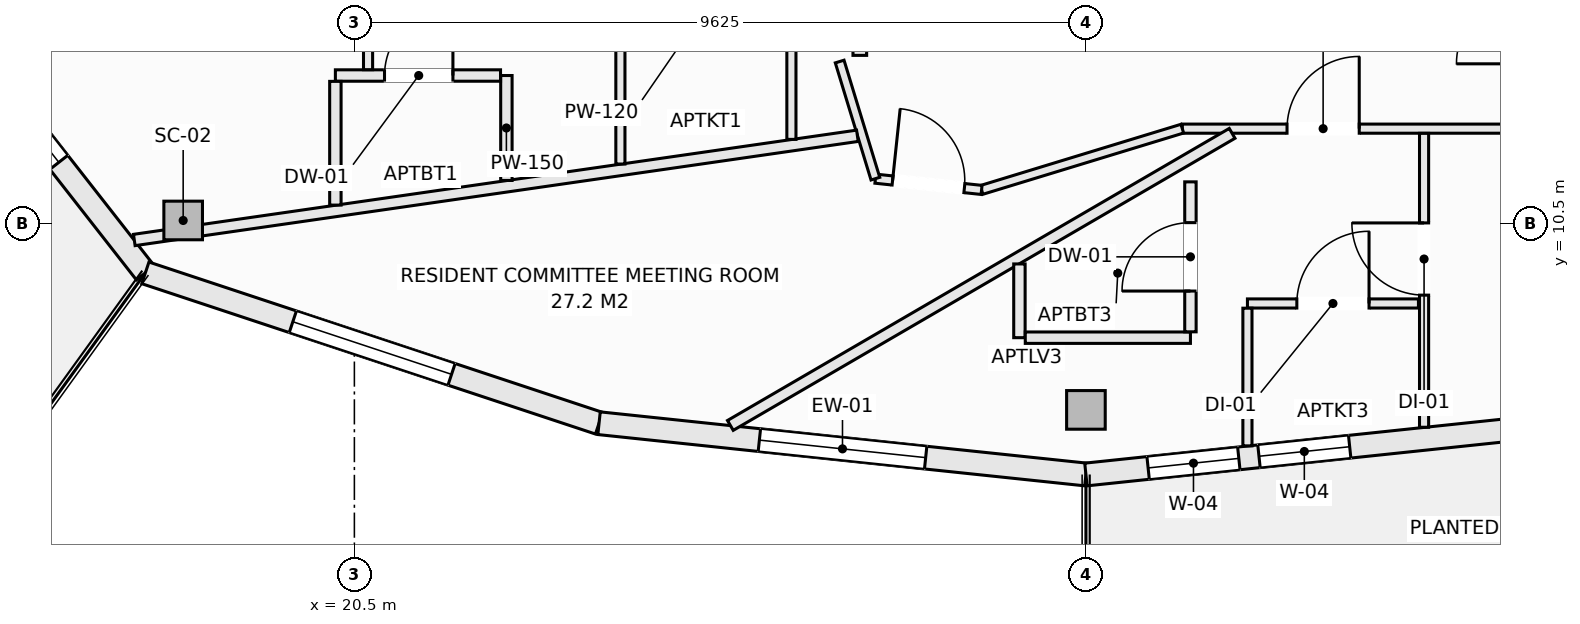
"""IFC4 building model, lengths in metres.
Left out: names, types, materials, properties, quantities, classifications, styles, units other than length and angle.
Written with IfcOpenShell. Run it as: python <this file> out.ifc"""

import sys

from ifc_helpers import new_model, si_unit, direction, frame, frame_2d, origin, origin_2d, place, context, subcontext, project, spatial, rectangle, hollow_rectangle, extrude, element, fill, save


model = new_model("IFC4")
c1 = context("Model", 3, precision=1e-05, world=origin(), true_north=direction((0.0, 1.0)))
c2 = subcontext(c1, "Body", "Model", "MODEL_VIEW")
j1 = project(units=[si_unit("LENGTHUNIT", "METRE"), si_unit("PLANEANGLEUNIT", "RADIAN")], contexts=[c1])
p1 = place(None, origin())
s1 = spatial("IfcSite", under=j1, at=p1, CompositionType="ELEMENT")
p2 = place(p1, origin())
s2 = spatial("IfcBuilding", under=s1, at=p2, CompositionType="ELEMENT")
p3 = place(p2, frame((0.0, 0.0, 232.7)))
s3 = spatial("IfcBuildingStorey", under=s2, at=p3, CompositionType="ELEMENT", Elevation=232.7)
for number, where, z_axis, x_axis in (
    (1, (18.247, 10.542, -0.27), (0.0, 0.0, 1.0), (1.0, 0.0, 0.0)),
    (2, (30.125, 8.05, -0.27), (0.0, 0.0, 1.0), (1.0, 0.0, 0.0)),
):
    element("IfcColumn", number, at=place(p3, frame(where, z_axis=z_axis, x_axis=x_axis)), inside=s3, PredefinedType="COLUMN", context=c2, shape_type="SweptSolid", body=[
        extrude(hollow_rectangle(XDim=0.508, YDim=0.508, WallThickness=0.019, at=origin_2d()), origin(), (0.0, 0.0, 1.0), 3.3),
    ])
p4 = place(p3, frame((14.117, 14.493, 0.0), z_axis=(0.0, 0.0, 1.0), x_axis=(0.616450126935, -0.787393955401, 0.0)))
e3 = element("IfcWall", 3, at=p4, inside=s3, PredefinedType="SOLIDWALL", context=c2, shape_type="SweptSolid", body=[
    extrude(rectangle(XDim=5.893, YDim=0.3, at=frame_2d((2.946, 0.0))), origin(), (0.0, 0.0, 1.0), 2.605),
])
p5 = place(p4, frame((1.846, 0.0, 0.72)))
e4 = element("IfcOpeningElement", 4, at=p5, cuts=e3, PredefinedType="OPENING", context=c2, shape_type="SweptSolid", body=[
    extrude(rectangle(XDim=2.2, YDim=1.65, at=frame_2d((1.1, 0.825))), frame((0.0, 0.16, 0.0), z_axis=(0.0, -1.0, 0.0), x_axis=(1.0, 0.0, 0.0)), (0.0, 0.0, 1.0), 0.32),
])
p6 = place(p3, frame((17.75, 9.853, 0.0), z_axis=(0.0, 0.0, 1.0), x_axis=(0.949240877604, -0.314550085495, 0.0)))
e5 = element("IfcWall", 5, at=p6, inside=s3, PredefinedType="SOLIDWALL", context=c2, shape_type="SweptSolid", body=[
    extrude(rectangle(XDim=6.288, YDim=0.3, at=frame_2d((3.144, 0.0))), origin(), (0.0, 0.0, 1.0), 2.605),
])
p7 = place(p6, frame((2.044, 0.0, 0.72)))
e6 = element("IfcOpeningElement", 6, at=p7, cuts=e5, PredefinedType="OPENING", context=c2, shape_type="SweptSolid", body=[
    extrude(rectangle(XDim=2.2, YDim=1.65, at=frame_2d((1.1, 0.825))), frame((0.0, 0.16, 0.0), z_axis=(0.0, -1.0, 0.0), x_axis=(1.0, 0.0, 0.0)), (0.0, 0.0, 1.0), 0.32),
])
p8 = place(p3, frame((23.719, 7.875, 0.0), z_axis=(0.0, 0.0, 1.0), x_axis=(0.994497142298, -0.104763705363, 0.0)))
e7 = element("IfcWall", 7, at=p8, inside=s3, PredefinedType="SOLIDWALL", context=c2, shape_type="SweptSolid", body=[
    extrude(rectangle(XDim=6.441, YDim=0.3, at=frame_2d((3.221, 0.0))), origin(), (0.0, 0.0, 1.0), 2.605),
])
p9 = place(p8, frame((2.121, 0.0, 0.72)))
e8 = element("IfcOpeningElement", 8, at=p9, cuts=e7, PredefinedType="OPENING", context=c2, shape_type="SweptSolid", body=[
    extrude(rectangle(XDim=2.2, YDim=1.65, at=frame_2d((1.1, 0.825))), frame((0.0, 0.16, 0.0), z_axis=(0.0, -1.0, 0.0), x_axis=(1.0, 0.0, 0.0)), (0.0, 0.0, 1.0), 0.32),
])
p10 = place(p3, frame((30.125, 7.2, 0.0), z_axis=(0.0, 0.0, 1.0), x_axis=(0.994497142298, 0.104763705363, 0.0)))
e9 = element("IfcWall", 9, at=p10, inside=s3, PredefinedType="SOLIDWALL", context=c2, shape_type="SweptSolid", body=[
    extrude(rectangle(XDim=6.441, YDim=0.3, at=frame_2d((3.221, 0.0))), origin(), (0.0, 0.0, 1.0), 2.605),
])
p11 = place(p10, frame((0.823, 0.0, 0.72)))
e10 = element("IfcOpeningElement", 10, at=p11, cuts=e9, PredefinedType="OPENING", context=c2, shape_type="SweptSolid", body=[
    extrude(rectangle(XDim=1.2, YDim=1.65, at=frame_2d((0.6, 0.825))), frame((0.0, 0.16, 0.0), z_axis=(0.0, -1.0, 0.0), x_axis=(1.0, 0.0, 0.0)), (0.0, 0.0, 1.0), 0.32),
])
p12 = place(p10, frame((2.289, 0.0, 0.72)))
e11 = element("IfcOpeningElement", 11, at=p12, cuts=e9, PredefinedType="OPENING", context=c2, shape_type="SweptSolid", body=[
    extrude(rectangle(XDim=1.2, YDim=1.65, at=frame_2d((0.6, 0.825))), frame((0.0, 0.16, 0.0), z_axis=(0.0, -1.0, 0.0), x_axis=(1.0, 0.0, 0.0)), (0.0, 0.0, 1.0), 0.32),
])
p13 = place(p3, frame((27.15, 12.714, 0.0), z_axis=(0.0, 0.0, 1.0), x_axis=(0.0, 1.0, 0.0)))
e12 = element("IfcWall", 12, at=p13, inside=s3, PredefinedType="SOLIDWALL", context=c2, shape_type="SweptSolid", body=[
    extrude(rectangle(XDim=4.244, YDim=0.18, at=frame_2d((2.122, 0.0))), origin(), (0.0, 0.0, 1.0), 3.03),
])
p14 = place(p13, frame((0.928, 0.0, 0.0)))
e13 = element("IfcOpeningElement", 13, at=p14, cuts=e12, PredefinedType="OPENING", context=c2, shape_type="SweptSolid", body=[
    extrude(rectangle(XDim=0.95, YDim=2.1, at=frame_2d((0.475, 1.05))), frame((0.0, 0.1, 0.0), z_axis=(0.0, -1.0, 0.0), x_axis=(1.0, 0.0, 0.0)), (0.0, 0.0, 1.0), 0.2),
])
p15 = place(p13, frame((2.64, 0.0, 0.0)))
e14 = element("IfcOpeningElement", 14, at=p15, cuts=e12, PredefinedType="OPENING", context=c2, shape_type="SweptSolid", body=[
    extrude(rectangle(XDim=0.95, YDim=2.1, at=frame_2d((0.475, 1.05))), frame((0.0, 0.1, 0.0), z_axis=(0.0, -1.0, 0.0), x_axis=(1.0, 0.0, 0.0)), (0.0, 0.0, 1.0), 0.2),
])
p16 = place(p3, frame((31.393, 11.75, 0.0), z_axis=(0.0, 0.0, 1.0), x_axis=(1.0, 0.0, 0.0)))
e15 = element("IfcWall", 15, at=p16, inside=s3, PredefinedType="PARTITIONING", context=c2, shape_type="SweptSolid", body=[
    extrude(rectangle(XDim=4.495, YDim=0.12, at=frame_2d((2.248, 0.0))), origin(), (0.0, 0.0, 1.0), 3.03),
])
p17 = place(p16, frame((1.378, 0.0, 0.0)))
e16 = element("IfcOpeningElement", 16, at=p17, cuts=e15, PredefinedType="OPENING", context=c2, shape_type="SweptSolid", body=[
    extrude(rectangle(XDim=0.95, YDim=2.1, at=frame_2d((0.475, 1.05))), frame((0.0, 0.07, 0.0), z_axis=(0.0, -1.0, 0.0), x_axis=(1.0, 0.0, 0.0)), (0.0, 0.0, 1.0), 0.14),
])
p18 = place(p3, frame((28.752, 10.944, 0.0), z_axis=(0.0, 0.0, 1.0), x_axis=(0.956462690075, 0.291854625618, 0.0)))
e17 = element("IfcWall", 17, at=p18, inside=s3, PredefinedType="PARTITIONING", context=c2, shape_type="SweptSolid", body=[
    extrude(rectangle(XDim=2.761, YDim=0.12, at=frame_2d((1.381, 0.0))), origin(), (0.0, 0.0, 1.0), 3.03),
])
p19 = place(p3, frame((27.355, 11.092, 0.0), z_axis=(0.0, 0.0, 1.0), x_axis=(0.994438591301, -0.105318033263, 0.0)))
e18 = element("IfcWall", 18, at=p19, inside=s3, PredefinedType="PARTITIONING", context=c2, shape_type="SweptSolid", body=[
    extrude(rectangle(XDim=1.405, YDim=0.12, at=frame_2d((0.702, 0.0))), origin(), (0.0, 0.0, 1.0), 3.03),
])
p20 = place(p19, frame((0.227, 0.0, 0.0)))
e19 = element("IfcOpeningElement", 19, at=p20, cuts=e18, PredefinedType="OPENING", context=c2, shape_type="SweptSolid", body=[
    extrude(rectangle(XDim=0.95, YDim=2.1, at=frame_2d((0.475, 1.05))), frame((0.0, 0.07, 0.0), z_axis=(0.0, -1.0, 0.0), x_axis=(1.0, 0.0, 0.0)), (0.0, 0.0, 1.0), 0.14),
])
p21 = place(p3, frame((26.885, 12.633, 0.0), z_axis=(0.0, 0.0, 1.0), x_axis=(0.291710302586, -0.956506716843, 0.0)))
e20 = element("IfcWall", 20, at=p21, inside=s3, PredefinedType="PARTITIONING", context=c2, shape_type="SweptSolid", body=[
    extrude(rectangle(XDim=1.611, YDim=0.12, at=frame_2d((0.806, 0.0))), origin(), (0.0, 0.0, 1.0), 3.03),
])
p22 = place(p3, frame((17.604, 10.285, 0.0), z_axis=(0.0, 0.0, 1.0), x_axis=(0.989781675617, 0.142591144933, 0.0)))
e21 = element("IfcWall", 21, at=p22, inside=s3, PredefinedType="PARTITIONING", context=c2, shape_type="SweptSolid", body=[
    extrude(rectangle(XDim=9.612, YDim=0.15, at=frame_2d((4.806, 0.0))), origin(), (0.0, 0.0, 1.0), 2.605),
])
p23 = place(p3, frame((26.25, 11.609, 0.0), z_axis=(0.0, 0.0, 1.0), x_axis=(0.0, 1.0, 0.0)))
e22 = element("IfcWall", 22, at=p23, inside=s3, PredefinedType="PARTITIONING", context=c2, shape_type="SweptSolid", body=[
    extrude(rectangle(XDim=1.691, YDim=0.12, at=frame_2d((0.846, 0.0))), origin(), (0.0, 0.0, 1.0), 3.03),
])
p24 = place(p3, frame((24.0, 11.285, 0.0), z_axis=(0.0, 0.0, 1.0), x_axis=(0.0, 1.0, 0.0)))
e23 = element("IfcWall", 23, at=p24, inside=s3, PredefinedType="PARTITIONING", context=c2, shape_type="SweptSolid", body=[
    extrude(rectangle(XDim=1.953, YDim=0.12, at=frame_2d((0.977, 0.0))), origin(), (0.0, 0.0, 1.0), 3.03),
])
p25 = place(p3, frame((22.5, 11.069, 0.0), z_axis=(0.0, 0.0, 1.0), x_axis=(0.0, 1.0, 0.0)))
e24 = element("IfcWall", 24, at=p25, inside=s3, PredefinedType="PARTITIONING", context=c2, shape_type="SweptSolid", body=[
    extrude(rectangle(XDim=1.38, YDim=0.15, at=frame_2d((0.69, 0.0))), origin(), (0.0, 0.0, 1.0), 3.03),
])
p26 = place(p3, frame((20.25, 12.449, 0.0), z_axis=(0.0, 0.0, 1.0), x_axis=(1.0, 0.0, 0.0)))
e25 = element("IfcWall", 25, at=p26, inside=s3, PredefinedType="PARTITIONING", context=c2, shape_type="SweptSolid", body=[
    extrude(rectangle(XDim=2.173, YDim=0.15, at=frame_2d((1.086, 0.0))), origin(), (0.0, 0.0, 1.0), 3.03),
])
p27 = place(p26, frame((0.646, 0.0, 0.0)))
e26 = element("IfcOpeningElement", 26, at=p27, cuts=e25, PredefinedType="OPENING", context=c2, shape_type="SweptSolid", body=[
    extrude(rectangle(XDim=0.9, YDim=2.1, at=frame_2d((0.45, 1.05))), frame((0.0, 0.085, 0.0), z_axis=(0.0, -1.0, 0.0), x_axis=(1.0, 0.0, 0.0)), (0.0, 0.0, 1.0), 0.17),
])
p28 = place(p3, frame((20.68, 12.526, 0.0), z_axis=(0.0, 0.0, 1.0), x_axis=(0.0, 1.0, 0.0)))
e27 = element("IfcWall", 27, at=p28, inside=s3, PredefinedType="PARTITIONING", context=c2, shape_type="SweptSolid", body=[
    extrude(rectangle(XDim=2.379, YDim=0.12, at=frame_2d((1.189, 0.0))), origin(), (0.0, 0.0, 1.0), 2.478),
])
p29 = place(p28, frame((0.715, 0.0, 0.0)))
e28 = element("IfcOpeningElement", 28, at=p29, cuts=e27, PredefinedType="OPENING", context=c2, shape_type="SweptSolid", body=[
    extrude(rectangle(XDim=0.95, YDim=2.1, at=frame_2d((0.475, 1.05))), frame((0.0, 0.07, 0.0), z_axis=(0.0, -1.0, 0.0), x_axis=(1.0, 0.0, 0.0)), (0.0, 0.0, 1.0), 0.14),
])
p30 = place(p3, frame((20.25, 10.744, 0.0), z_axis=(0.0, 0.0, 1.0), x_axis=(0.0, 1.0, 0.0)))
e29 = element("IfcWall", 29, at=p30, inside=s3, PredefinedType="PARTITIONING", context=c2, shape_type="SweptSolid", body=[
    extrude(rectangle(XDim=1.628, YDim=0.15, at=frame_2d((0.814, 0.0))), origin(), (0.0, 0.0, 1.0), 3.03),
])
p31 = place(p3, frame((25.447, 7.846, 0.0), z_axis=(0.0, 0.0, 1.0), x_axis=(0.864278106544, 0.503014268732, 0.0)))
e30 = element("IfcWall", 30, at=p31, inside=s3, PredefinedType="PARTITIONING", context=c2, shape_type="SweptSolid", body=[
    extrude(rectangle(XDim=7.638, YDim=0.15, at=frame_2d((3.819, 0.0))), origin(), (0.0, 0.0, 1.0), 3.03),
])
p32 = place(p3, frame((34.574, 7.821, 0.0), z_axis=(0.0, 0.0, 1.0), x_axis=(0.0, 1.0, 0.0)))
e31 = element("IfcWall", 31, at=p32, inside=s3, PredefinedType="PARTITIONING", context=c2, shape_type="SweptSolid", body=[
    extrude(rectangle(XDim=3.867, YDim=0.12, at=frame_2d((1.933, 0.0))), origin(), (0.0, 0.0, 1.0), 3.03),
])
p33 = place(p32, frame((1.738, 0.0, 0.0)))
e32 = element("IfcOpeningElement", 32, at=p33, cuts=e31, PredefinedType="OPENING", context=c2, shape_type="SweptSolid", body=[
    extrude(rectangle(XDim=0.95, YDim=2.1, at=frame_2d((0.475, 1.05))), frame((0.0, 0.07, 0.0), z_axis=(0.0, -1.0, 0.0), x_axis=(1.0, 0.0, 0.0)), (0.0, 0.0, 1.0), 0.14),
])
p34 = place(p3, frame((32.25, 9.45, 0.0), z_axis=(0.0, 0.0, 1.0), x_axis=(1.0, 0.0, 0.0)))
e33 = element("IfcWall", 33, at=p34, inside=s3, PredefinedType="PARTITIONING", context=c2, shape_type="SweptSolid", body=[
    extrude(rectangle(XDim=2.25, YDim=0.12, at=frame_2d((1.125, 0.0))), origin(), (0.0, 0.0, 1.0), 3.03),
])
p35 = place(p34, frame((0.65, 0.0, 0.0)))
e34 = element("IfcOpeningElement", 34, at=p35, cuts=e33, PredefinedType="OPENING", context=c2, shape_type="SweptSolid", body=[
    extrude(rectangle(XDim=0.95, YDim=2.1, at=frame_2d((0.475, 1.05))), frame((0.0, 0.07, 0.0), z_axis=(0.0, -1.0, 0.0), x_axis=(1.0, 0.0, 0.0)), (0.0, 0.0, 1.0), 0.14),
])
p36 = place(p3, frame((32.25, 7.577, 0.0), z_axis=(0.0, 0.0, 1.0), x_axis=(0.0, 1.0, 0.0)))
e35 = element("IfcWall", 35, at=p36, inside=s3, PredefinedType="PARTITIONING", context=c2, shape_type="SweptSolid", body=[
    extrude(rectangle(XDim=1.811, YDim=0.12, at=frame_2d((0.906, 0.0))), origin(), (0.0, 0.0, 1.0), 3.03),
])
p37 = place(p3, frame((29.25, 9.0, 0.0), z_axis=(0.0, 0.0, 1.0), x_axis=(0.0, 1.0, 0.0)))
e36 = element("IfcWall", 36, at=p37, inside=s3, PredefinedType="PARTITIONING", context=c2, shape_type="SweptSolid", body=[
    extrude(rectangle(XDim=0.97, YDim=0.15, at=frame_2d((0.485, 0.0))), origin(), (0.0, 0.0, 1.0), 3.03),
])
p38 = place(p3, frame((29.327, 9.0, 0.0), z_axis=(0.0, 0.0, 1.0), x_axis=(1.0, 0.0, 0.0)))
e37 = element("IfcWall", 37, at=p38, inside=s3, PredefinedType="PARTITIONING", context=c2, shape_type="SweptSolid", body=[
    extrude(rectangle(XDim=2.173, YDim=0.15, at=frame_2d((1.086, 0.0))), origin(), (0.0, 0.0, 1.0), 3.03),
])
p39 = place(p3, frame((31.5, 9.077, 0.0), z_axis=(0.0, 0.0, 1.0), x_axis=(0.0, 1.0, 0.0)))
e38 = element("IfcWall", 38, at=p39, inside=s3, PredefinedType="PARTITIONING", context=c2, shape_type="SweptSolid", body=[
    extrude(rectangle(XDim=1.973, YDim=0.15, at=frame_2d((0.987, 0.0))), origin(), (0.0, 0.0, 1.0), 3.03),
])
p40 = place(p39, frame((0.537, 0.0, 0.0)))
e39 = element("IfcOpeningElement", 39, at=p40, cuts=e38, PredefinedType="OPENING", context=c2, shape_type="SweptSolid", body=[
    extrude(rectangle(XDim=0.9, YDim=2.1, at=frame_2d((0.45, 1.05))), frame((0.0, 0.085, 0.0), z_axis=(0.0, -1.0, 0.0), x_axis=(1.0, 0.0, 0.0)), (0.0, 0.0, 1.0), 0.17),
])
p41 = place(p5, origin())
e40 = element("IfcWindow", 40, at=p41, inside=s3, PartitioningType="SINGLE_PANEL", PredefinedType="WINDOW", context=c2, shape_type="SweptSolid", body=[
    extrude(rectangle(XDim=2.2, YDim=1.65, at=frame_2d((1.1, 0.825))), frame((0.0, 0.03, 0.0), z_axis=(0.0, -1.0, 0.0), x_axis=(1.0, 0.0, 0.0)), (0.0, 0.0, 1.0), 0.06),
])
fill(e4, e40)
p42 = place(p7, origin())
e41 = element("IfcWindow", 41, at=p42, inside=s3, PartitioningType="SINGLE_PANEL", PredefinedType="WINDOW", context=c2, shape_type="SweptSolid", body=[
    extrude(rectangle(XDim=2.2, YDim=1.65, at=frame_2d((1.1, 0.825))), frame((0.0, 0.03, 0.0), z_axis=(0.0, -1.0, 0.0), x_axis=(1.0, 0.0, 0.0)), (0.0, 0.0, 1.0), 0.06),
])
fill(e6, e41)
p43 = place(p9, origin())
e42 = element("IfcWindow", 42, at=p43, inside=s3, PartitioningType="SINGLE_PANEL", PredefinedType="WINDOW", context=c2, shape_type="SweptSolid", body=[
    extrude(rectangle(XDim=2.2, YDim=1.65, at=frame_2d((1.1, 0.825))), frame((0.0, 0.03, 0.0), z_axis=(0.0, -1.0, 0.0), x_axis=(1.0, 0.0, 0.0)), (0.0, 0.0, 1.0), 0.06),
])
fill(e8, e42)
p44 = place(p11, origin())
e43 = element("IfcWindow", 43, at=p44, inside=s3, PartitioningType="SINGLE_PANEL", PredefinedType="WINDOW", context=c2, shape_type="SweptSolid", body=[
    extrude(rectangle(XDim=1.2, YDim=1.65, at=frame_2d((0.6, 0.825))), frame((0.0, 0.03, 0.0), z_axis=(0.0, -1.0, 0.0), x_axis=(1.0, 0.0, 0.0)), (0.0, 0.0, 1.0), 0.06),
])
fill(e10, e43)
p45 = place(p20, origin())
e44 = element("IfcDoor", 44, at=p45, inside=s3, OperationType="SINGLE_SWING_LEFT", PredefinedType="DOOR", context=c2, shape_type="SweptSolid", body=[
    extrude(rectangle(XDim=0.95, YDim=2.1, at=frame_2d((0.475, 1.05))), frame((0.0, 0.025, 0.0), z_axis=(0.0, -1.0, 0.0), x_axis=(1.0, 0.0, 0.0)), (0.0, 0.0, 1.0), 0.05),
])
fill(e19, e44)
p46 = place(p17, origin())
e45 = element("IfcDoor", 45, at=p46, inside=s3, OperationType="SINGLE_SWING_RIGHT", PredefinedType="DOOR", context=c2, shape_type="SweptSolid", body=[
    extrude(rectangle(XDim=0.95, YDim=2.1, at=frame_2d((0.475, 1.05))), frame((0.0, 0.025, 0.0), z_axis=(0.0, -1.0, 0.0), x_axis=(1.0, 0.0, 0.0)), (0.0, 0.0, 1.0), 0.05),
])
fill(e16, e45)
p47 = place(p27, origin())
e46 = element("IfcDoor", 46, at=p47, inside=s3, OperationType="SINGLE_SWING_RIGHT", PredefinedType="DOOR", context=c2, shape_type="SweptSolid", body=[
    extrude(rectangle(XDim=0.9, YDim=2.1, at=frame_2d((0.45, 1.05))), frame((0.0, 0.025, 0.0), z_axis=(0.0, -1.0, 0.0), x_axis=(1.0, 0.0, 0.0)), (0.0, 0.0, 1.0), 0.05),
])
fill(e26, e46)
p48 = place(p35, origin())
e47 = element("IfcDoor", 47, at=p48, inside=s3, OperationType="SINGLE_SWING_RIGHT", PredefinedType="DOOR", context=c2, shape_type="SweptSolid", body=[
    extrude(rectangle(XDim=0.95, YDim=2.1, at=frame_2d((0.475, 1.05))), frame((0.0, 0.025, 0.0), z_axis=(0.0, -1.0, 0.0), x_axis=(1.0, 0.0, 0.0)), (0.0, 0.0, 1.0), 0.05),
])
fill(e34, e47)
p49 = place(p40, origin())
e48 = element("IfcDoor", 48, at=p49, inside=s3, OperationType="SINGLE_SWING_LEFT", PredefinedType="DOOR", context=c2, shape_type="SweptSolid", body=[
    extrude(rectangle(XDim=0.9, YDim=2.1, at=frame_2d((0.45, 1.05))), frame((0.0, 0.025, 0.0), z_axis=(0.0, -1.0, 0.0), x_axis=(1.0, 0.0, 0.0)), (0.0, 0.0, 1.0), 0.05),
])
fill(e39, e48)
p50 = place(p33, origin())
e49 = element("IfcDoor", 49, at=p50, inside=s3, OperationType="SINGLE_SWING_RIGHT", PredefinedType="DOOR", context=c2, shape_type="SweptSolid", body=[
    extrude(rectangle(XDim=0.95, YDim=2.1, at=frame_2d((0.475, 1.05))), frame((0.0, 0.025, 0.0), z_axis=(0.0, -1.0, 0.0), x_axis=(1.0, 0.0, 0.0)), (0.0, 0.0, 1.0), 0.05),
])
fill(e32, e49)
p51 = place(p12, origin())
e50 = element("IfcWindow", 50, at=p51, inside=s3, PartitioningType="SINGLE_PANEL", PredefinedType="WINDOW", context=c2, shape_type="SweptSolid", body=[
    extrude(rectangle(XDim=1.2, YDim=1.65, at=frame_2d((0.6, 0.825))), frame((0.0, 0.03, 0.0), z_axis=(0.0, -1.0, 0.0), x_axis=(1.0, 0.0, 0.0)), (0.0, 0.0, 1.0), 0.06),
])
fill(e11, e50)
save(model, sys.argv[1])
